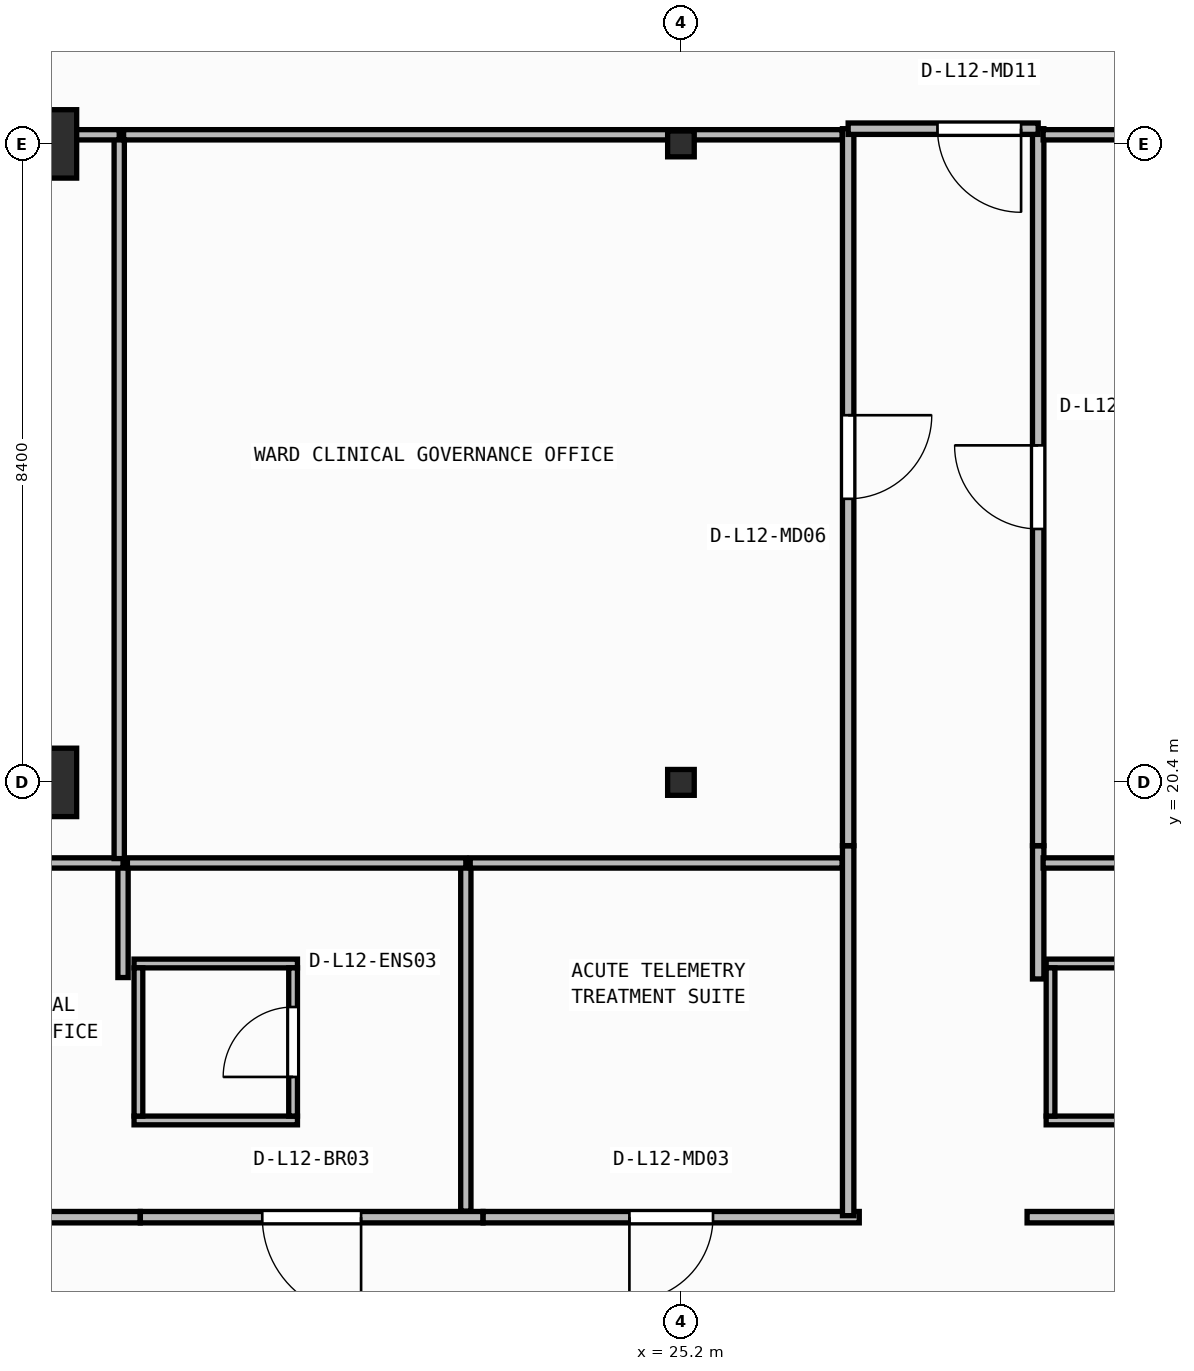
"""IFC4 building model, lengths in metres.
Left out: names, types, materials, properties, quantities, classifications, styles, units other than length and angle.
Written with IfcOpenShell. Run it as: python <this file> out.ifc"""

import sys

from ifc_helpers import new_model, si_unit, direction, frame, frame_2d, origin, origin_2d, place, context, subcontext, project, spatial, rectangle, i_section, extrude, element, fill, save


model = new_model("IFC4")
c1 = context("Model", 3, precision=1e-05, world=origin(), true_north=direction((0.0, 1.0)))
c2 = subcontext(c1, "Body", "Model", "MODEL_VIEW")
j1 = project(units=[si_unit("LENGTHUNIT", "METRE"), si_unit("PLANEANGLEUNIT", "RADIAN")], contexts=[c1])
p1 = place(None, origin())
s1 = spatial("IfcSite", under=j1, at=p1, CompositionType="ELEMENT")
p2 = place(p1, origin())
s2 = spatial("IfcBuilding", under=s1, at=p2, CompositionType="ELEMENT")
p3 = place(p2, frame((0.0, 0.0, 50.15)))
s3 = spatial("IfcBuildingStorey", under=s2, at=p3, CompositionType="ELEMENT", Elevation=50.15)
p4 = place(p3, frame((16.8, 20.4, 0.0), z_axis=(0.0, 0.0, 1.0), x_axis=(1.0, 0.0, 0.0)))
e1 = element("IfcColumn", 1, at=p4, inside=s3, PredefinedType="COLUMN", context=c2, shape_type="SweptSolid", body=[
    extrude(rectangle(XDim=0.9, YDim=0.9, at=origin_2d()), origin(), (0.0, 0.0, 1.0), 3.95),
])
p5 = place(p3, frame((25.2, 20.4, 0.0), z_axis=(0.0, 0.0, 1.0), x_axis=(1.0, 0.0, 0.0)))
e2 = element("IfcColumn", 2, at=p5, inside=s3, PredefinedType="COLUMN", context=c2, shape_type="SweptSolid", body=[
    extrude(i_section(OverallWidth=0.35, OverallDepth=0.34, WebThickness=0.016, FlangeThickness=0.028, at=origin_2d()), origin(), (0.0, 0.0, 1.0), 3.95),
])
p6 = place(p3, frame((16.8, 28.8, 0.0), z_axis=(0.0, 0.0, 1.0), x_axis=(1.0, 0.0, 0.0)))
e3 = element("IfcColumn", 3, at=p6, inside=s3, PredefinedType="COLUMN", context=c2, shape_type="SweptSolid", body=[
    extrude(rectangle(XDim=0.9, YDim=0.9, at=origin_2d()), origin(), (0.0, 0.0, 1.0), 3.95),
])
p7 = place(p3, frame((25.2, 28.8, 0.0), z_axis=(0.0, 0.0, 1.0), x_axis=(1.0, 0.0, 0.0)))
e4 = element("IfcColumn", 4, at=p7, inside=s3, PredefinedType="COLUMN", context=c2, shape_type="SweptSolid", body=[
    extrude(i_section(OverallWidth=0.35, OverallDepth=0.34, WebThickness=0.016, FlangeThickness=0.028, at=origin_2d()), origin(), (0.0, 0.0, 1.0), 3.95),
])
for number, where, z_axis, x_axis in (
    (5, (18.005, 15.952, 0.0), (0.0, 0.0, 1.0), (1.0, 0.0, 0.0)),
    (6, (18.005, 18.018, 0.0), (0.0, 0.0, 1.0), (1.0, 0.0, 0.0)),
):
    element("IfcWall", number, at=place(p3, frame(where, z_axis=z_axis, x_axis=x_axis)), inside=s3, PredefinedType="PARTITIONING", context=c2, shape_type="SweptSolid", body=[
        extrude(rectangle(XDim=2.15, YDim=0.115, at=frame_2d((1.075, 0.0))), origin(), (0.0, 0.0, 1.0), 3.71),
    ])
p8 = place(p3, frame((18.062, 16.01, 0.0), z_axis=(0.0, 0.0, 1.0), x_axis=(0.0, 1.0, 0.0)))
e7 = element("IfcWall", 7, at=p8, inside=s3, PredefinedType="PARTITIONING", context=c2, shape_type="SweptSolid", body=[
    extrude(rectangle(XDim=1.95, YDim=0.115, at=frame_2d((0.975, 0.0))), origin(), (0.0, 0.0, 1.0), 3.71),
])
p9 = place(p3, frame((20.097, 16.01, 0.0), z_axis=(0.0, 0.0, 1.0), x_axis=(0.0, 1.0, 0.0)))
e8 = element("IfcWall", 8, at=p9, inside=s3, PredefinedType="PARTITIONING", context=c2, shape_type="SweptSolid", body=[
    extrude(rectangle(XDim=1.95, YDim=0.115, at=frame_2d((0.975, 0.0))), origin(), (0.0, 0.0, 1.0), 3.71),
])
p10 = place(p9, frame((0.515, 0.0, 0.0)))
e9 = element("IfcOpeningElement", 9, at=p10, cuts=e8, PredefinedType="OPENING", context=c2, shape_type="SweptSolid", body=[
    extrude(rectangle(XDim=0.92, YDim=2.1, at=frame_2d((0.46, 1.05))), frame((0.0, 0.067, 0.0), z_axis=(0.0, -1.0, 0.0), x_axis=(1.0, 0.0, 0.0)), (0.0, 0.0, 1.0), 0.135),
])
p11 = place(p3, frame((30.005, 15.952, 0.0), z_axis=(0.0, 0.0, 1.0), x_axis=(1.0, 0.0, 0.0)))
e10 = element("IfcWall", 10, at=p11, inside=s3, PredefinedType="PARTITIONING", context=c2, shape_type="SweptSolid", body=[
    extrude(rectangle(XDim=2.15, YDim=0.115, at=frame_2d((1.075, 0.0))), origin(), (0.0, 0.0, 1.0), 3.329),
])
p12 = place(p3, frame((30.005, 18.018, 0.0), z_axis=(0.0, 0.0, 1.0), x_axis=(1.0, 0.0, 0.0)))
e11 = element("IfcWall", 11, at=p12, inside=s3, PredefinedType="PARTITIONING", context=c2, shape_type="SweptSolid", body=[
    extrude(rectangle(XDim=2.15, YDim=0.115, at=frame_2d((1.075, 0.0))), origin(), (0.0, 0.0, 1.0), 3.71),
])
p13 = place(p3, frame((30.062, 16.01, 0.0), z_axis=(0.0, 0.0, 1.0), x_axis=(0.0, 1.0, 0.0)))
e12 = element("IfcWall", 12, at=p13, inside=s3, PredefinedType="PARTITIONING", context=c2, shape_type="SweptSolid", body=[
    extrude(rectangle(XDim=1.95, YDim=0.115, at=frame_2d((0.975, 0.0))), origin(), (0.0, 0.0, 1.0), 3.71),
])
p14 = place(p3, frame((18.086, 14.68, 0.0), z_axis=(0.0, 0.0, 1.0), x_axis=(-1.0, 0.0, 0.0)))
e13 = element("IfcWall", 13, at=p14, inside=s3, PredefinedType="PARTITIONING", context=c2, shape_type="SweptSolid", body=[
    extrude(rectangle(XDim=4.148, YDim=0.15, at=frame_2d((2.074, 0.0))), origin(), (0.0, 0.0, 1.0), 3.71),
])
p15 = place(p14, frame((1.524, 0.0, 0.0)))
e14 = element("IfcOpeningElement", 14, at=p15, cuts=e13, PredefinedType="OPENING", context=c2, shape_type="SweptSolid", body=[
    extrude(rectangle(XDim=1.1, YDim=2.1, at=frame_2d((0.55, 1.05))), frame((0.0, 0.085, 0.0), z_axis=(0.0, -1.0, 0.0), x_axis=(1.0, 0.0, 0.0)), (0.0, 0.0, 1.0), 0.17),
])
p16 = place(p3, frame((22.596, 14.68, 0.0), z_axis=(0.0, 0.0, 1.0), x_axis=(-1.0, 0.0, 0.0)))
e15 = element("IfcWall", 15, at=p16, inside=s3, PredefinedType="PARTITIONING", context=c2, shape_type="SweptSolid", body=[
    extrude(rectangle(XDim=4.508, YDim=0.15, at=frame_2d((2.254, 0.0))), origin(), (0.0, 0.0, 1.0), 3.71),
])
p17 = place(p16, frame((1.604, 0.0, 0.0)))
e16 = element("IfcOpeningElement", 16, at=p17, cuts=e15, PredefinedType="OPENING", context=c2, shape_type="SweptSolid", body=[
    extrude(rectangle(XDim=1.3, YDim=2.15, at=frame_2d((0.65, 1.075))), frame((0.0, 0.085, 0.0), z_axis=(0.0, -1.0, 0.0), x_axis=(1.0, 0.0, 0.0)), (0.0, 0.0, 1.0), 0.17),
])
p18 = place(p3, frame((27.546, 14.68, 0.0), z_axis=(0.0, 0.0, 1.0), x_axis=(-1.0, 0.0, 0.0)))
e17 = element("IfcWall", 17, at=p18, inside=s3, PredefinedType="PARTITIONING", context=c2, shape_type="SweptSolid", body=[
    extrude(rectangle(XDim=4.948, YDim=0.15, at=frame_2d((2.474, 0.0))), origin(), (0.0, 0.0, 1.0), 3.71),
])
p19 = place(p18, frame((1.924, 0.0, 0.0)))
e18 = element("IfcOpeningElement", 18, at=p19, cuts=e17, PredefinedType="OPENING", context=c2, shape_type="SweptSolid", body=[
    extrude(rectangle(XDim=1.1, YDim=2.1, at=frame_2d((0.55, 1.05))), frame((0.0, 0.085, 0.0), z_axis=(0.0, -1.0, 0.0), x_axis=(1.0, 0.0, 0.0)), (0.0, 0.0, 1.0), 0.17),
])
p20 = place(p3, frame((34.806, 14.68, 0.0), z_axis=(0.0, 0.0, 1.0), x_axis=(-1.0, 0.0, 0.0)))
e19 = element("IfcWall", 19, at=p20, inside=s3, PredefinedType="PARTITIONING", context=c2, shape_type="SweptSolid", body=[
    extrude(rectangle(XDim=5.052, YDim=0.15, at=frame_2d((2.526, 0.0))), origin(), (0.0, 0.0, 1.0), 3.71),
])
p21 = place(p20, frame((1.876, 0.0, 0.0)))
e20 = element("IfcOpeningElement", 20, at=p21, cuts=e19, PredefinedType="OPENING", context=c2, shape_type="SweptSolid", body=[
    extrude(rectangle(XDim=1.3, YDim=2.15, at=frame_2d((0.65, 1.075))), frame((0.0, 0.085, 0.0), z_axis=(0.0, -1.0, 0.0), x_axis=(1.0, 0.0, 0.0)), (0.0, 0.0, 1.0), 0.17),
])
p22 = place(p3, frame((27.4, 19.566, 0.0), z_axis=(0.0, 0.0, 1.0), x_axis=(0.0, -1.0, 0.0)))
e21 = element("IfcWall", 21, at=p22, inside=s3, PredefinedType="PARTITIONING", context=c2, shape_type="SweptSolid", body=[
    extrude(rectangle(XDim=4.866, YDim=0.15, at=frame_2d((2.433, 0.0))), origin(), (0.0, 0.0, 1.0), 3.71),
])
p23 = place(p3, frame((27.4, 29.0, 0.0), z_axis=(0.0, 0.0, 1.0), x_axis=(0.0, -1.0, 0.0)))
e22 = element("IfcWall", 22, at=p23, inside=s3, PredefinedType="PARTITIONING", context=c2, shape_type="SweptSolid", body=[
    extrude(rectangle(XDim=9.432, YDim=0.15, at=frame_2d((4.716, 0.0))), origin(), (0.0, 0.0, 1.0), 3.71),
])
p24 = place(p23, frame((3.769, 0.0, 0.0)))
e23 = element("IfcOpeningElement", 23, at=p24, cuts=e22, PredefinedType="OPENING", context=c2, shape_type="SweptSolid", body=[
    extrude(rectangle(XDim=1.1, YDim=2.1, at=frame_2d((0.55, 1.05))), frame((0.0, 0.085, 0.0), z_axis=(0.0, -1.0, 0.0), x_axis=(1.0, 0.0, 0.0)), (0.0, 0.0, 1.0), 0.17),
])
p25 = place(p3, frame((29.9, 17.814, 0.0), z_axis=(0.0, 0.0, 1.0), x_axis=(0.0, 1.0, 0.0)))
e24 = element("IfcWall", 24, at=p25, inside=s3, PredefinedType="PARTITIONING", context=c2, shape_type="SweptSolid", body=[
    extrude(rectangle(XDim=1.752, YDim=0.15, at=frame_2d((0.876, 0.0))), origin(), (0.0, 0.0, 1.0), 3.71),
])
p26 = place(p3, frame((29.9, 19.568, 0.0), z_axis=(0.0, 0.0, 1.0), x_axis=(0.0, 1.0, 0.0)))
e25 = element("IfcWall", 25, at=p26, inside=s3, PredefinedType="PARTITIONING", context=c2, shape_type="SweptSolid", body=[
    extrude(rectangle(XDim=9.432, YDim=0.15, at=frame_2d((4.716, 0.0))), origin(), (0.0, 0.0, 1.0), 3.71),
])
p27 = place(p26, frame((4.166, 0.0, 0.0)))
e26 = element("IfcOpeningElement", 26, at=p27, cuts=e25, PredefinedType="OPENING", context=c2, shape_type="SweptSolid", body=[
    extrude(rectangle(XDim=1.1, YDim=2.1, at=frame_2d((0.55, 1.05))), frame((0.0, 0.085, 0.0), z_axis=(0.0, -1.0, 0.0), x_axis=(1.0, 0.0, 0.0)), (0.0, 0.0, 1.0), 0.17),
])
p28 = place(p3, frame((29.9, 29.0, 0.0), z_axis=(0.0, 0.0, 1.0), x_axis=(-1.0, 0.0, 0.0)))
e27 = element("IfcWall", 27, at=p28, inside=s3, PredefinedType="PARTITIONING", context=c2, shape_type="SweptSolid", body=[
    extrude(rectangle(XDim=2.5, YDim=0.15, at=frame_2d((1.25, 0.0))), origin(), (0.0, 0.0, 1.0), 3.279),
])
p29 = place(p28, frame((0.225, 0.0, 0.0)))
e28 = element("IfcOpeningElement", 28, at=p29, cuts=e27, PredefinedType="OPENING", context=c2, shape_type="SweptSolid", body=[
    extrude(rectangle(XDim=1.1, YDim=2.1, at=frame_2d((0.55, 1.05))), frame((0.0, 0.085, 0.0), z_axis=(0.0, -1.0, 0.0), x_axis=(1.0, 0.0, 0.0)), (0.0, 0.0, 1.0), 0.17),
])
p30 = place(p3, frame((17.86, 17.833, 0.0), z_axis=(0.0, 0.0, 1.0), x_axis=(0.0, 1.0, 0.0)))
e29 = element("IfcWall", 29, at=p30, inside=s3, PredefinedType="PARTITIONING", context=c2, shape_type="SweptSolid", body=[
    extrude(rectangle(XDim=1.508, YDim=0.135, at=frame_2d((0.754, 0.0))), origin(), (0.0, 0.0, 1.0), 3.71),
])
p31 = place(p3, frame((17.86, 19.34, 0.0), z_axis=(0.0, 0.0, 1.0), x_axis=(-1.0, 0.0, 0.0)))
e30 = element("IfcWall", 30, at=p31, inside=s3, PredefinedType="PARTITIONING", context=c2, shape_type="SweptSolid", body=[
    extrude(rectangle(XDim=4.093, YDim=0.135, at=frame_2d((2.046, 0.0))), origin(), (0.0, 0.0, 1.0), 3.71),
])
p32 = place(p31, frame((2.728, 0.0, 0.0)))
e31 = element("IfcOpeningElement", 31, at=p32, cuts=e30, PredefinedType="OPENING", context=c2, shape_type="SweptSolid", body=[
    extrude(rectangle(XDim=1.1, YDim=2.1, at=frame_2d((0.55, 1.05))), frame((0.0, 0.077, 0.0), z_axis=(0.0, -1.0, 0.0), x_axis=(1.0, 0.0, 0.0)), (0.0, 0.0, 1.0), 0.155),
])
p33 = place(p3, frame((22.37, 14.76, 0.0), z_axis=(0.0, 0.0, 1.0), x_axis=(0.0, 1.0, 0.0)))
e32 = element("IfcWall", 32, at=p33, inside=s3, PredefinedType="PARTITIONING", context=c2, shape_type="SweptSolid", body=[
    extrude(rectangle(XDim=4.58, YDim=0.135, at=frame_2d((2.29, 0.0))), origin(), (0.0, 0.0, 1.0), 3.71),
])
p34 = place(p3, frame((22.37, 19.34, 0.0), z_axis=(0.0, 0.0, 1.0), x_axis=(-1.0, 0.0, 0.0)))
e33 = element("IfcWall", 33, at=p34, inside=s3, PredefinedType="PARTITIONING", context=c2, shape_type="SweptSolid", body=[
    extrude(rectangle(XDim=4.453, YDim=0.135, at=frame_2d((2.226, 0.0))), origin(), (0.0, 0.0, 1.0), 3.71),
])
p35 = place(p3, frame((27.32, 19.34, 0.0), z_axis=(0.0, 0.0, 1.0), x_axis=(-1.0, 0.0, 0.0)))
e34 = element("IfcWall", 34, at=p35, inside=s3, PredefinedType="PARTITIONING", context=c2, shape_type="SweptSolid", body=[
    extrude(rectangle(XDim=4.893, YDim=0.135, at=frame_2d((2.446, 0.0))), origin(), (0.0, 0.0, 1.0), 3.71),
])
p36 = place(p3, frame((17.81, 19.397, 0.0), z_axis=(0.0, 0.0, 1.0), x_axis=(0.0, 1.0, 0.0)))
e35 = element("IfcWall", 35, at=p36, inside=s3, PredefinedType="PARTITIONING", context=c2, shape_type="SweptSolid", body=[
    extrude(rectangle(XDim=9.522, YDim=0.135, at=frame_2d((4.761, 0.0))), origin(), (0.0, 0.0, 1.0), 3.71),
])
p37 = place(p3, frame((17.81, 28.92, 0.0), z_axis=(0.0, 0.0, 1.0), x_axis=(-1.0, 0.0, 0.0)))
e36 = element("IfcWall", 36, at=p37, inside=s3, PredefinedType="PARTITIONING", context=c2, shape_type="SweptSolid", body=[
    extrude(rectangle(XDim=3.243, YDim=0.135, at=frame_2d((1.622, 0.0))), origin(), (0.0, 0.0, 1.0), 3.073),
])
p38 = place(p3, frame((27.32, 28.92, 0.0), z_axis=(0.0, 0.0, 1.0), x_axis=(-1.0, 0.0, 0.0)))
e37 = element("IfcWall", 37, at=p38, inside=s3, PredefinedType="PARTITIONING", context=c2, shape_type="SweptSolid", body=[
    extrude(rectangle(XDim=9.453, YDim=0.135, at=frame_2d((4.726, 0.0))), origin(), (0.0, 0.0, 1.0), 3.073),
])
p39 = place(p3, frame((34.58, 19.34, 0.0), z_axis=(0.0, 0.0, 1.0), x_axis=(-1.0, 0.0, 0.0)))
e38 = element("IfcWall", 38, at=p39, inside=s3, PredefinedType="PARTITIONING", context=c2, shape_type="SweptSolid", body=[
    extrude(rectangle(XDim=4.615, YDim=0.135, at=frame_2d((2.308, 0.0))), origin(), (0.0, 0.0, 1.0), 3.71),
])
p40 = place(p3, frame((33.15, 28.92, 0.0), z_axis=(0.0, 0.0, 1.0), x_axis=(-1.0, 0.0, 0.0)))
e39 = element("IfcWall", 39, at=p40, inside=s3, PredefinedType="PARTITIONING", context=c2, shape_type="SweptSolid", body=[
    extrude(rectangle(XDim=3.185, YDim=0.135, at=frame_2d((1.592, 0.0))), origin(), (0.0, 0.0, 1.0), 3.279),
])
p41 = place(p10, origin())
e40 = element("IfcDoor", 40, at=p41, inside=s3, OperationType="SINGLE_SWING_LEFT", PredefinedType="DOOR", context=c2, shape_type="SweptSolid", body=[
    extrude(rectangle(XDim=0.92, YDim=2.1, at=frame_2d((0.46, 1.05))), frame((0.0, 0.025, 0.0), z_axis=(0.0, -1.0, 0.0), x_axis=(1.0, 0.0, 0.0)), (0.0, 0.0, 1.0), 0.05),
])
fill(e9, e40)
p42 = place(p17, origin())
e41 = element("IfcDoor", 41, at=p42, inside=s3, OperationType="SINGLE_SWING_LEFT", PredefinedType="DOOR", context=c2, shape_type="SweptSolid", body=[
    extrude(rectangle(XDim=1.3, YDim=2.15, at=frame_2d((0.65, 1.075))), frame((0.0, 0.025, 0.0), z_axis=(0.0, -1.0, 0.0), x_axis=(1.0, 0.0, 0.0)), (0.0, 0.0, 1.0), 0.05),
])
fill(e16, e41)
p43 = place(p19, origin())
e42 = element("IfcDoor", 42, at=p43, inside=s3, OperationType="SINGLE_SWING_RIGHT", PredefinedType="DOOR", context=c2, shape_type="SweptSolid", body=[
    extrude(rectangle(XDim=1.1, YDim=2.1, at=frame_2d((0.55, 1.05))), frame((0.0, 0.025, 0.0), z_axis=(0.0, -1.0, 0.0), x_axis=(1.0, 0.0, 0.0)), (0.0, 0.0, 1.0), 0.05),
])
fill(e18, e42)
p44 = place(p24, origin())
e43 = element("IfcDoor", 43, at=p44, inside=s3, OperationType="SINGLE_SWING_LEFT", PredefinedType="DOOR", context=c2, shape_type="SweptSolid", body=[
    extrude(rectangle(XDim=1.1, YDim=2.1, at=frame_2d((0.55, 1.05))), frame((0.0, 0.025, 0.0), z_axis=(0.0, -1.0, 0.0), x_axis=(1.0, 0.0, 0.0)), (0.0, 0.0, 1.0), 0.05),
])
fill(e23, e43)
p45 = place(p27, origin())
e44 = element("IfcDoor", 44, at=p45, inside=s3, OperationType="SINGLE_SWING_RIGHT", PredefinedType="DOOR", context=c2, shape_type="SweptSolid", body=[
    extrude(rectangle(XDim=1.1, YDim=2.1, at=frame_2d((0.55, 1.05))), frame((0.0, 0.025, 0.0), z_axis=(0.0, -1.0, 0.0), x_axis=(1.0, 0.0, 0.0)), (0.0, 0.0, 1.0), 0.05),
])
fill(e26, e44)
p46 = place(p29, origin())
e45 = element("IfcDoor", 45, at=p46, inside=s3, OperationType="SINGLE_SWING_LEFT", PredefinedType="DOOR", context=c2, shape_type="SweptSolid", body=[
    extrude(rectangle(XDim=1.1, YDim=2.1, at=frame_2d((0.55, 1.05))), frame((0.0, 0.025, 0.0), z_axis=(0.0, -1.0, 0.0), x_axis=(1.0, 0.0, 0.0)), (0.0, 0.0, 1.0), 0.05),
])
fill(e28, e45)
save(model, sys.argv[1])
